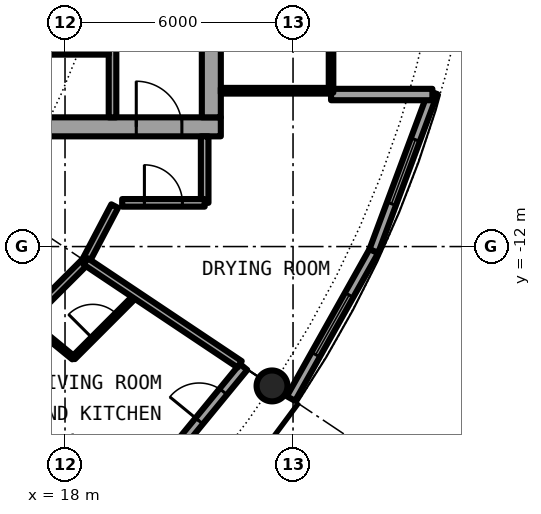
"""IFC4 building model, lengths in metres.
Left out: names, types, materials, properties, quantities, classifications, styles, units other than length and angle.
Written with IfcOpenShell. Run it as: python <this file> out.ifc"""

import sys

from ifc_helpers import new_model, si_unit, direction, frame, frame_2d, origin, origin_2d, place, context, subcontext, project, spatial, rectangle, hollow_circle, extrude, element, fill, save


model = new_model("IFC4")
c1 = context("Model", 3, precision=1e-05, world=origin(), true_north=direction((0.0, 1.0)))
c2 = subcontext(c1, "Body", "Model", "MODEL_VIEW")
j1 = project(units=[si_unit("LENGTHUNIT", "METRE"), si_unit("PLANEANGLEUNIT", "RADIAN")], contexts=[c1])
p1 = place(None, origin())
s1 = spatial("IfcSite", under=j1, at=p1, CompositionType="ELEMENT")
p2 = place(p1, origin())
s2 = spatial("IfcBuilding", under=s1, at=p2, CompositionType="ELEMENT")
p3 = place(p2, frame((0.0, 0.0, 167.7)))
s3 = spatial("IfcBuildingStorey", under=s2, at=p3, CompositionType="ELEMENT", Elevation=167.7)
p4 = place(p3, frame((23.448, -15.667, 0.0), z_axis=(0.0, 0.0, 1.0), x_axis=(1.0, 0.0, 0.0)))
e1 = element("IfcColumn", 1, at=p4, inside=s3, PredefinedType="COLUMN", context=c2, shape_type="SweptSolid", body=[
    extrude(hollow_circle(Radius=0.406, WallThickness=0.04, at=origin_2d()), origin(), (0.0, 0.0, 1.0), 3.05),
])
p5 = place(p3, frame((19.304, -19.304, 0.0), z_axis=(0.0, 0.0, 1.0), x_axis=(0.634382322723, 0.773019449054, 0.0)))
e2 = element("IfcWall", 2, at=p5, inside=s3, PredefinedType="SOLIDWALL", context=c2, shape_type="SweptSolid", body=[
    extrude(rectangle(XDim=5.352, YDim=0.25, at=frame_2d((2.676, 0.0))), origin(), (0.0, 0.0, 1.0), 2.7),
])
p6 = place(p5, frame((0.441, 0.0, 0.3)))
e3 = element("IfcOpeningElement", 3, at=p6, cuts=e2, PredefinedType="OPENING", context=c2, shape_type="SweptSolid", body=[
    extrude(rectangle(XDim=1.8, YDim=2.1, at=frame_2d((0.9, 1.05))), frame((0.0, 0.135, 0.0), z_axis=(0.0, -1.0, 0.0), x_axis=(1.0, 0.0, 0.0)), (0.0, 0.0, 1.0), 0.27),
])
p7 = place(p5, frame((3.51, 0.0, 0.0)))
e4 = element("IfcOpeningElement", 4, at=p7, cuts=e2, PredefinedType="OPENING", context=c2, shape_type="SweptSolid", body=[
    extrude(rectangle(XDim=1.0, YDim=2.2, at=frame_2d((0.5, 1.1))), frame((0.0, 0.135, 0.0), z_axis=(0.0, -1.0, 0.0), x_axis=(1.0, 0.0, 0.0)), (0.0, 0.0, 1.0), 0.27),
])
p8 = place(p3, frame((23.946, -16.0, 0.0), z_axis=(0.0, 0.0, 1.0), x_axis=(0.489696356642, 0.871893042919, 0.0)))
e5 = element("IfcWall", 5, at=p8, inside=s3, PredefinedType="SOLIDWALL", context=c2, shape_type="SweptSolid", body=[
    extrude(rectangle(XDim=4.454, YDim=0.25, at=frame_2d((2.227, 0.0))), origin(), (0.0, 0.0, 1.0), 2.7),
])
p9 = place(p8, frame((1.327, 0.0, 0.3)))
e6 = element("IfcOpeningElement", 6, at=p9, cuts=e5, PredefinedType="OPENING", context=c2, shape_type="SweptSolid", body=[
    extrude(rectangle(XDim=1.8, YDim=2.1, at=frame_2d((0.9, 1.05))), frame((0.0, 0.135, 0.0), z_axis=(0.0, -1.0, 0.0), x_axis=(1.0, 0.0, 0.0)), (0.0, 0.0, 1.0), 0.27),
])
p10 = place(p3, frame((26.127, -12.117, 0.0), z_axis=(0.0, 0.0, 1.0), x_axis=(0.349247811493, 0.937030397675, 0.0)))
e7 = element("IfcWall", 7, at=p10, inside=s3, PredefinedType="SOLIDWALL", context=c2, shape_type="SweptSolid", body=[
    extrude(rectangle(XDim=4.452, YDim=0.25, at=frame_2d((2.226, 0.0))), origin(), (0.0, 0.0, 1.0), 2.7),
])
p11 = place(p10, frame((1.327, 0.0, 0.3)))
e8 = element("IfcOpeningElement", 8, at=p11, cuts=e7, PredefinedType="OPENING", context=c2, shape_type="SweptSolid", body=[
    extrude(rectangle(XDim=1.8, YDim=2.1, at=frame_2d((0.9, 1.05))), frame((0.0, 0.135, 0.0), z_axis=(0.0, -1.0, 0.0), x_axis=(1.0, 0.0, 0.0)), (0.0, 0.0, 1.0), 0.27),
])
p12 = place(p3, frame((25.0, -8.0, 0.0), z_axis=(0.0, 0.0, 1.0), x_axis=(1.0, 0.0, 0.0)))
e9 = element("IfcWall", 9, at=p12, inside=s3, PredefinedType="SOLIDWALL", context=c2, shape_type="SweptSolid", body=[
    extrude(rectangle(XDim=2.667, YDim=0.3, at=frame_2d((1.333, 0.0))), origin(), (0.0, 0.0, 1.0), 2.7),
])
p13 = place(p3, frame((8.5, -8.85, 0.0), z_axis=(0.0, 0.0, 1.0), x_axis=(1.0, 0.0, 0.0)))
e10 = element("IfcWall", 10, at=p13, inside=s3, PredefinedType="SHEAR", context=c2, shape_type="SweptSolid", body=[
    extrude(rectangle(XDim=13.6, YDim=0.5, at=frame_2d((6.8, 0.0))), origin(), (0.0, 0.0, 1.0), 3.05),
])
p14 = place(p13, frame((11.375, 0.0, 0.0)))
e11 = element("IfcOpeningElement", 11, at=p14, cuts=e10, PredefinedType="OPENING", context=c2, shape_type="SweptSolid", body=[
    extrude(rectangle(XDim=1.2, YDim=2.3, at=frame_2d((0.6, 1.15))), frame((0.0, 0.26, 0.0), z_axis=(0.0, -1.0, 0.0), x_axis=(1.0, 0.0, 0.0)), (0.0, 0.0, 1.0), 0.52),
])
p15 = place(p3, frame((21.85, 8.6, 0.0), z_axis=(0.0, 0.0, 1.0), x_axis=(0.0, -1.0, 0.0)))
e12 = element("IfcWall", 12, at=p15, inside=s3, PredefinedType="SHEAR", context=c2, shape_type="SweptSolid", body=[
    extrude(rectangle(XDim=17.2, YDim=0.5, at=frame_2d((8.6, 0.0))), origin(), (0.0, 0.0, 1.0), 3.05),
])
p16 = place(p15, frame((7.7, 0.0, 0.0)))
e13 = element("IfcOpeningElement", 13, at=p16, cuts=e12, PredefinedType="OPENING", context=c2, shape_type="SweptSolid", body=[
    extrude(rectangle(XDim=1.8, YDim=2.3, at=frame_2d((0.9, 1.15))), frame((0.0, 0.26, 0.0), z_axis=(0.0, -1.0, 0.0), x_axis=(1.0, 0.0, 0.0)), (0.0, 0.0, 1.0), 0.52),
])
p17 = place(p3, frame((19.25, -8.6, 0.0), z_axis=(0.0, 0.0, 1.0), x_axis=(0.0, 1.0, 0.0)))
e14 = element("IfcWall", 14, at=p17, inside=s3, PredefinedType="SOLIDWALL", context=c2, shape_type="SweptSolid", body=[
    extrude(rectangle(XDim=7.025, YDim=0.2, at=frame_2d((3.513, 0.0))), origin(), (0.0, 0.0, 1.0), 2.7),
])
p18 = place(p17, frame((2.35, 0.0, 0.0)))
e15 = element("IfcOpeningElement", 15, at=p18, cuts=e14, PredefinedType="OPENING", context=c2, shape_type="SweptSolid", body=[
    extrude(rectangle(XDim=1.1, YDim=2.3, at=frame_2d((0.55, 1.15))), frame((0.0, 0.11, 0.0), z_axis=(0.0, -1.0, 0.0), x_axis=(1.0, 0.0, 0.0)), (0.0, 0.0, 1.0), 0.22),
])
p19 = place(p3, frame((15.45, -6.875, 0.0), z_axis=(0.0, 0.0, 1.0), x_axis=(1.0, 0.0, 0.0)))
e16 = element("IfcWall", 16, at=p19, inside=s3, PredefinedType="PARTITIONING", context=c2, shape_type="SweptSolid", body=[
    extrude(rectangle(XDim=3.7, YDim=0.15, at=frame_2d((1.85, 0.0))), origin(), (0.0, 0.0, 1.0), 2.7),
])
p20 = place(p19, frame((1.4, 0.0, 0.0)))
e17 = element("IfcOpeningElement", 17, at=p20, cuts=e16, PredefinedType="OPENING", context=c2, shape_type="SweptSolid", body=[
    extrude(rectangle(XDim=0.9, YDim=2.3, at=frame_2d((0.45, 1.15))), frame((0.0, 0.085, 0.0), z_axis=(0.0, -1.0, 0.0), x_axis=(1.0, 0.0, 0.0)), (0.0, 0.0, 1.0), 0.17),
])
p21 = place(p3, frame((22.1, -7.9, 0.0), z_axis=(0.0, 0.0, 1.0), x_axis=(1.0, 0.0, 0.0)))
e18 = element("IfcWall", 18, at=p21, inside=s3, PredefinedType="PARTITIONING", context=c2, shape_type="SweptSolid", body=[
    extrude(rectangle(XDim=2.84, YDim=0.15, at=frame_2d((1.42, 0.0))), origin(), (0.0, 0.0, 1.0), 2.7),
])
p22 = place(p3, frame((25.0, -7.95, 0.0), z_axis=(0.0, 0.0, 1.0), x_axis=(0.0, 1.0, 0.0)))
e19 = element("IfcWall", 19, at=p22, inside=s3, PredefinedType="PARTITIONING", context=c2, shape_type="SweptSolid", body=[
    extrude(rectangle(XDim=15.9, YDim=0.12, at=frame_2d((7.95, 0.0))), origin(), (0.0, 0.0, 1.0), 2.7),
])
p23 = place(p22, frame((0.95, 0.0, 0.1)))
e20 = element("IfcOpeningElement", 20, at=p23, cuts=e19, PredefinedType="OPENING", context=c2, shape_type="SweptSolid", body=[
    extrude(rectangle(XDim=14.0, YDim=2.35, at=frame_2d((7.0, 1.175))), frame((0.0, 0.07, 0.0), z_axis=(0.0, -1.0, 0.0), x_axis=(1.0, 0.0, 0.0)), (0.0, 0.0, 1.0), 0.14),
])
p24 = place(p3, frame((18.224, -14.927, 0.0), z_axis=(0.0, 0.0, 1.0), x_axis=(0.706897299114, 0.707316201218, 0.0)))
e21 = element("IfcWall", 21, at=p24, inside=s3, PredefinedType="PARTITIONING", context=c2, shape_type="SweptSolid", body=[
    extrude(rectangle(XDim=2.331, YDim=0.1, at=frame_2d((1.166, 0.0))), origin(), (0.0, 0.0, 1.0), 2.7),
])
p25 = place(p24, frame((0.716, 0.0, 0.0)))
e22 = element("IfcOpeningElement", 22, at=p25, cuts=e21, PredefinedType="OPENING", context=c2, shape_type="SweptSolid", body=[
    extrude(rectangle(XDim=0.9, YDim=2.3, at=frame_2d((0.45, 1.15))), frame((0.0, 0.06, 0.0), z_axis=(0.0, -1.0, 0.0), x_axis=(1.0, 0.0, 0.0)), (0.0, 0.0, 1.0), 0.12),
])
p26 = place(p3, frame((18.542, -12.389, 0.0), z_axis=(0.0, 0.0, 1.0), x_axis=(0.465605550524, 0.884992356646, 0.0)))
e23 = element("IfcWall", 23, at=p26, inside=s3, PredefinedType="PARTITIONING", context=c2, shape_type="SweptSolid", body=[
    extrude(rectangle(XDim=1.643, YDim=0.2, at=frame_2d((0.821, 0.0))), origin(), (0.0, 0.0, 1.0), 2.7),
])
p27 = place(p3, frame((12.389, -18.542, 0.0), z_axis=(0.0, 0.0, 1.0), x_axis=(0.707106781187, 0.707106781187, 0.0)))
e24 = element("IfcWall", 24, at=p27, inside=s3, PredefinedType="PARTITIONING", context=c2, shape_type="SweptSolid", body=[
    extrude(rectangle(XDim=8.702, YDim=0.2, at=frame_2d((4.351, 0.0))), origin(), (0.0, 0.0, 1.0), 2.7),
])
p28 = place(p27, frame((2.763, 0.0, 0.0)))
e25 = element("IfcOpeningElement", 25, at=p28, cuts=e24, PredefinedType="OPENING", context=c2, shape_type="SweptSolid", body=[
    extrude(rectangle(XDim=1.0, YDim=2.3, at=frame_2d((0.5, 1.15))), frame((0.0, 0.11, 0.0), z_axis=(0.0, -1.0, 0.0), x_axis=(1.0, 0.0, 0.0)), (0.0, 0.0, 1.0), 0.22),
])
p29 = place(p3, frame((21.675, -10.85, 0.0), z_axis=(0.0, 0.0, 1.0), x_axis=(0.0, 1.0, 0.0)))
e26 = element("IfcWall", 26, at=p29, inside=s3, PredefinedType="PARTITIONING", context=c2, shape_type="SweptSolid", body=[
    extrude(rectangle(XDim=1.75, YDim=0.2, at=frame_2d((0.875, 0.0))), origin(), (0.0, 0.0, 1.0), 2.7),
])
p30 = place(p3, frame((19.504, -10.85, 0.0), z_axis=(0.0, 0.0, 1.0), x_axis=(1.0, 0.0, 0.0)))
e27 = element("IfcWall", 27, at=p30, inside=s3, PredefinedType="PARTITIONING", context=c2, shape_type="SweptSolid", body=[
    extrude(rectangle(XDim=2.171, YDim=0.2, at=frame_2d((1.085, 0.0))), origin(), (0.0, 0.0, 1.0), 2.7),
])
p31 = place(p30, frame((0.585, 0.0, 0.0)))
e28 = element("IfcOpeningElement", 28, at=p31, cuts=e27, PredefinedType="OPENING", context=c2, shape_type="SweptSolid", body=[
    extrude(rectangle(XDim=1.0, YDim=2.3, at=frame_2d((0.5, 1.15))), frame((0.0, 0.11, 0.0), z_axis=(0.0, -1.0, 0.0), x_axis=(1.0, 0.0, 0.0)), (0.0, 0.0, 1.0), 0.22),
])
p32 = place(p3, frame((16.575, -16.575, 0.0), z_axis=(0.0, 0.0, 1.0), x_axis=(0.707106781187, -0.707106781187, 0.0)))
e29 = element("IfcWall", 29, at=p32, inside=s3, PredefinedType="PARTITIONING", context=c2, shape_type="SweptSolid", body=[
    extrude(rectangle(XDim=3.735, YDim=0.1, at=frame_2d((1.868, 0.0))), origin(), (0.0, 0.0, 1.0), 2.7),
])
p33 = place(p32, frame((1.417, 0.0, 0.0)))
e30 = element("IfcOpeningElement", 30, at=p33, cuts=e29, PredefinedType="OPENING", context=c2, shape_type="SweptSolid", body=[
    extrude(rectangle(XDim=0.9, YDim=2.3, at=frame_2d((0.45, 1.15))), frame((0.0, 0.06, 0.0), z_axis=(0.0, -1.0, 0.0), x_axis=(1.0, 0.0, 0.0)), (0.0, 0.0, 1.0), 0.12),
])
p34 = place(p3, frame((17.001, -13.93, 0.0), z_axis=(0.0, 0.0, 1.0), x_axis=(0.773633255921, -0.633633636523, 0.0)))
e31 = element("IfcWall", 31, at=p34, inside=s3, PredefinedType="PARTITIONING", context=c2, shape_type="SweptSolid", body=[
    extrude(rectangle(XDim=1.578, YDim=0.1, at=frame_2d((0.789, 0.0))), origin(), (0.0, 0.0, 1.0), 2.7),
])
p35 = place(p3, frame((18.542, -12.389, 0.0), z_axis=(0.0, 0.0, 1.0), x_axis=(0.831387096605, -0.55569370664, 0.0)))
e32 = element("IfcWall", 32, at=p35, inside=s3, PredefinedType="PARTITIONING", context=c2, shape_type="SweptSolid", body=[
    extrude(rectangle(XDim=4.875, YDim=0.2, at=frame_2d((2.438, 0.0))), origin(), (0.0, 0.0, 1.0), 2.7),
])
p36 = place(p7, origin())
e33 = element("IfcDoor", 33, at=p36, inside=s3, OperationType="SINGLE_SWING_LEFT", PredefinedType="DOOR", context=c2, shape_type="SweptSolid", body=[
    extrude(rectangle(XDim=1.0, YDim=2.2, at=frame_2d((0.5, 1.1))), frame((0.0, 0.025, 0.0), z_axis=(0.0, -1.0, 0.0), x_axis=(1.0, 0.0, 0.0)), (0.0, 0.0, 1.0), 0.05),
])
fill(e4, e33)
p37 = place(p9, origin())
e34 = element("IfcWindow", 34, at=p37, inside=s3, PartitioningType="SINGLE_PANEL", PredefinedType="WINDOW", context=c2, shape_type="SweptSolid", body=[
    extrude(rectangle(XDim=1.8, YDim=2.1, at=frame_2d((0.9, 1.05))), frame((0.0, 0.03, 0.0), z_axis=(0.0, -1.0, 0.0), x_axis=(1.0, 0.0, 0.0)), (0.0, 0.0, 1.0), 0.06),
])
fill(e6, e34)
p38 = place(p11, origin())
e35 = element("IfcWindow", 35, at=p38, inside=s3, PartitioningType="SINGLE_PANEL", PredefinedType="WINDOW", context=c2, shape_type="SweptSolid", body=[
    extrude(rectangle(XDim=1.8, YDim=2.1, at=frame_2d((0.9, 1.05))), frame((0.0, 0.03, 0.0), z_axis=(0.0, -1.0, 0.0), x_axis=(1.0, 0.0, 0.0)), (0.0, 0.0, 1.0), 0.06),
])
fill(e8, e35)
p39 = place(p20, origin())
e36 = element("IfcDoor", 36, at=p39, inside=s3, OperationType="SINGLE_SWING_LEFT", PredefinedType="DOOR", context=c2, shape_type="SweptSolid", body=[
    extrude(rectangle(XDim=0.9, YDim=2.3, at=frame_2d((0.45, 1.15))), frame((0.0, 0.025, 0.0), z_axis=(0.0, -1.0, 0.0), x_axis=(1.0, 0.0, 0.0)), (0.0, 0.0, 1.0), 0.05),
])
fill(e17, e36)
p40 = place(p14, origin())
e37 = element("IfcDoor", 37, at=p40, inside=s3, OperationType="SINGLE_SWING_LEFT", PredefinedType="DOOR", context=c2, shape_type="SweptSolid", body=[
    extrude(rectangle(XDim=1.2, YDim=2.3, at=frame_2d((0.6, 1.15))), frame((0.0, 0.025, 0.0), z_axis=(0.0, -1.0, 0.0), x_axis=(1.0, 0.0, 0.0)), (0.0, 0.0, 1.0), 0.05),
])
fill(e11, e37)
p41 = place(p23, origin())
e38 = element("IfcWindow", 38, at=p41, inside=s3, PartitioningType="SINGLE_PANEL", PredefinedType="WINDOW", context=c2, shape_type="SweptSolid", body=[
    extrude(rectangle(XDim=14.0, YDim=2.35, at=frame_2d((7.0, 1.175))), frame((0.0, 0.03, 0.0), z_axis=(0.0, -1.0, 0.0), x_axis=(1.0, 0.0, 0.0)), (0.0, 0.0, 1.0), 0.06),
])
fill(e20, e38)
p42 = place(p25, origin())
e39 = element("IfcDoor", 39, at=p42, inside=s3, OperationType="SINGLE_SWING_RIGHT", PredefinedType="DOOR", context=c2, shape_type="SweptSolid", body=[
    extrude(rectangle(XDim=0.9, YDim=2.3, at=frame_2d((0.45, 1.15))), frame((0.0, 0.025, 0.0), z_axis=(0.0, -1.0, 0.0), x_axis=(1.0, 0.0, 0.0)), (0.0, 0.0, 1.0), 0.05),
])
fill(e22, e39)
p43 = place(p31, origin())
e40 = element("IfcDoor", 40, at=p43, inside=s3, OperationType="SINGLE_SWING_LEFT", PredefinedType="DOOR", context=c2, shape_type="SweptSolid", body=[
    extrude(rectangle(XDim=1.0, YDim=2.3, at=frame_2d((0.5, 1.15))), frame((0.0, 0.025, 0.0), z_axis=(0.0, -1.0, 0.0), x_axis=(1.0, 0.0, 0.0)), (0.0, 0.0, 1.0), 0.05),
])
fill(e28, e40)
save(model, sys.argv[1])
